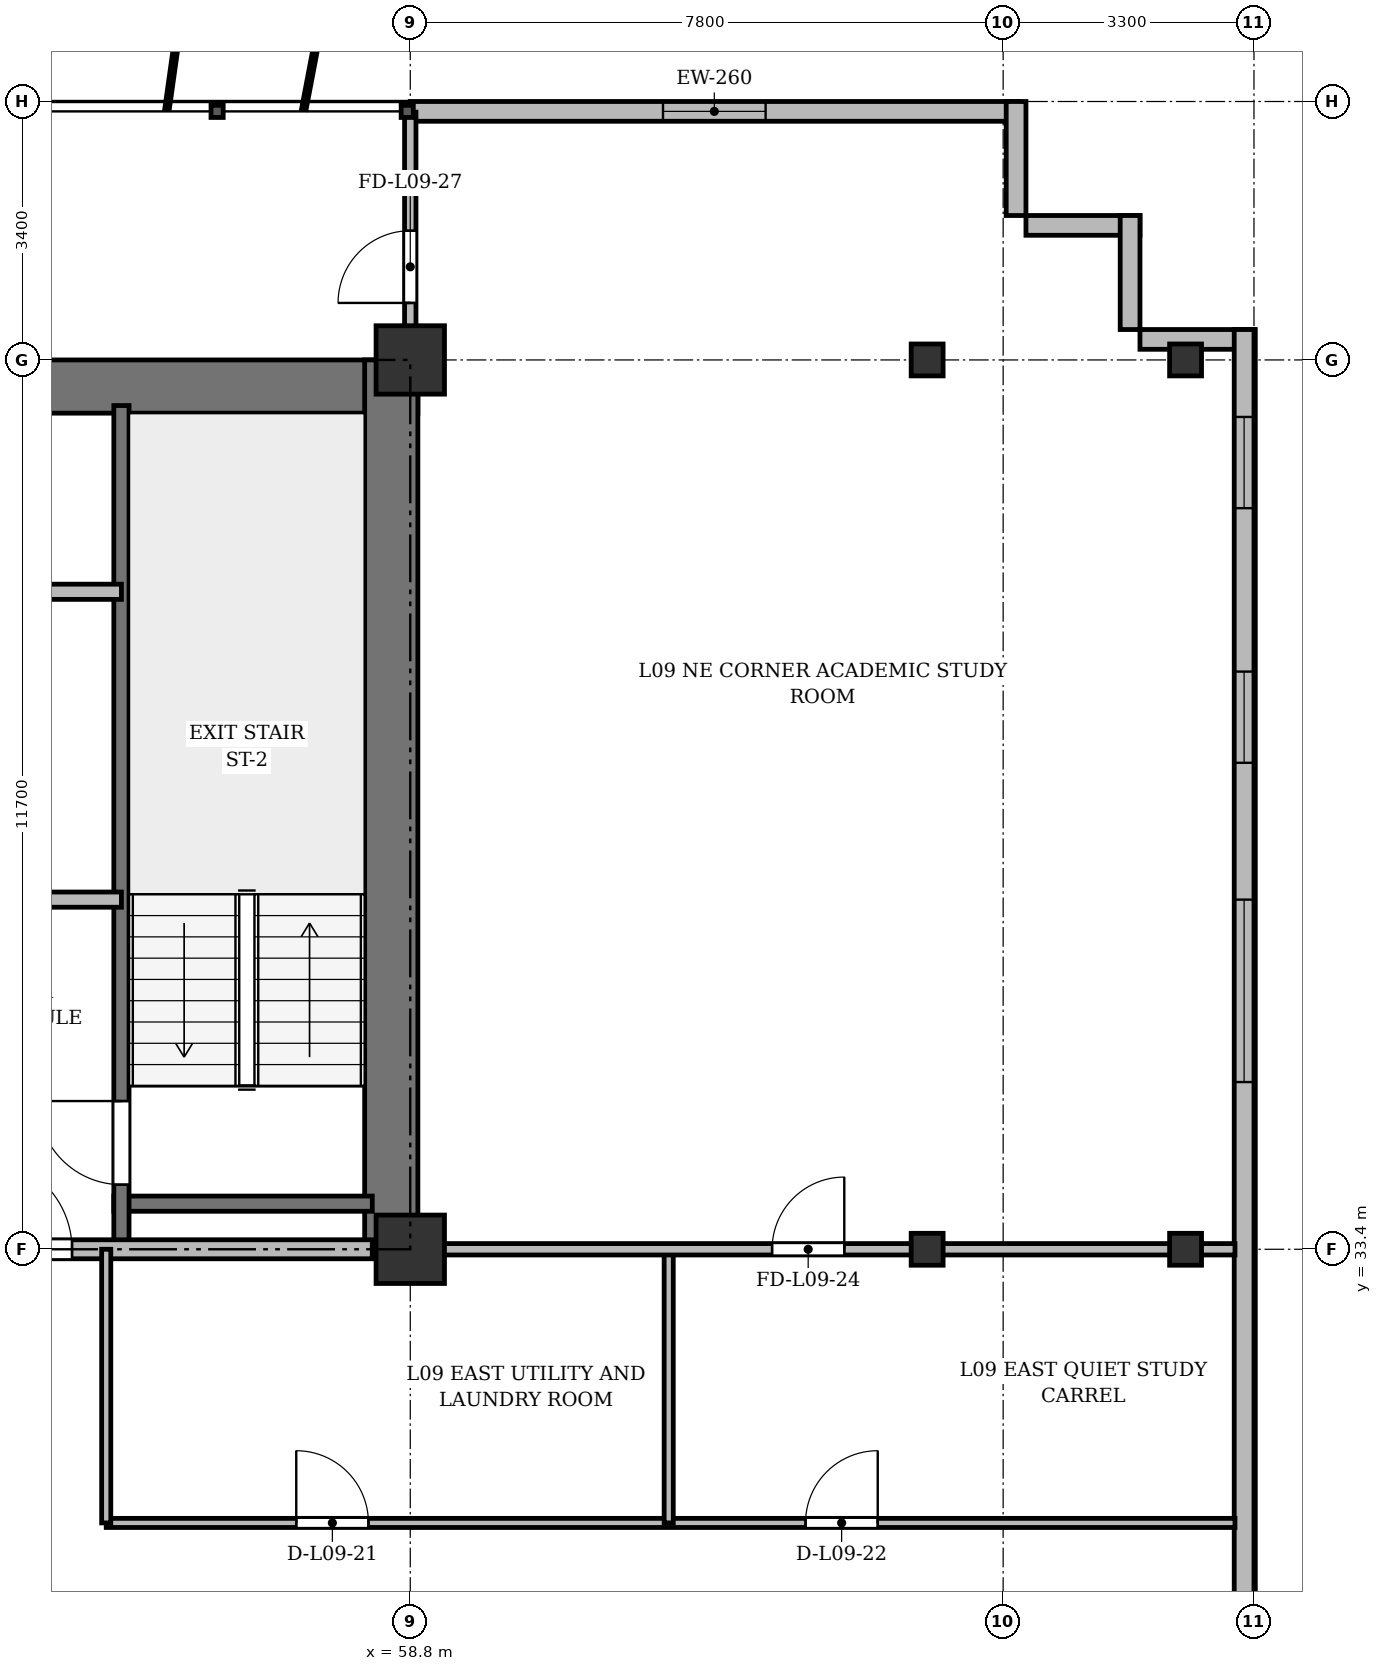
"""IFC4 building model, lengths in metres.
Left out: names, types, materials, properties, quantities, classifications, styles, units other than length and angle.
Written with IfcOpenShell. Run it as: python <this file> out.ifc"""

import sys

from ifc_helpers import new_model, si_unit, direction, frame, frame_2d, origin, origin_2d, place, context, subcontext, project, spatial, rectangle, i_section, extrude, source, transform, mapped, element, fill, save


model = new_model("IFC4")
c1 = context("Model", 3, precision=1e-05, world=origin(), true_north=direction((0.0, 1.0)))
c2 = subcontext(c1, "Body", "Model", "MODEL_VIEW")
j1 = project(units=[si_unit("LENGTHUNIT", "METRE"), si_unit("PLANEANGLEUNIT", "RADIAN")], contexts=[c1])
p1 = place(None, origin())
s1 = spatial("IfcSite", under=j1, at=p1, CompositionType="ELEMENT")
p2 = place(p1, origin())
s2 = spatial("IfcBuilding", under=s1, at=p2, CompositionType="ELEMENT")
p3 = place(p2, frame((0.0, 0.0, 37.9)))
s3 = spatial("IfcBuildingStorey", under=s2, at=p3, CompositionType="ELEMENT", Elevation=37.9)
m1 = source(origin(), c2, "Body", "SweptSolid", [
    extrude(rectangle(XDim=0.9, YDim=0.9, at=origin_2d()), origin(), (0.0, 0.0, 1.0), 3.6),
])
for number, where, z_axis, x_axis in (
    (1, (58.8, 33.4, 0.0), (0.0, 0.0, 1.0), (1.0, 0.0, 0.0)),
    (2, (58.8, 45.1, 0.0), (0.0, 0.0, 1.0), (1.0, 0.0, 0.0)),
):
    element("IfcColumn", number, at=place(p3, frame(where, z_axis=z_axis, x_axis=x_axis)), inside=s3, PredefinedType="COLUMN", context=c2, shape_type="MappedRepresentation", body=[
        mapped(m1, transform((0.0, 0.0, 0.0), x_axis=(1.0, 0.0, 0.0), y_axis=(0.0, 1.0, 0.0), z_axis=(0.0, 0.0, 1.0), scale=1.0)),
    ])
m2 = source(origin(), c2, "Body", "SweptSolid", [
    extrude(i_section(OverallWidth=0.42, OverallDepth=0.42, WebThickness=0.026, FlangeThickness=0.04, at=origin_2d()), origin(), (0.0, 0.0, 1.0), 3.6),
])
for number, where, z_axis, x_axis in (
    (3, (65.6, 33.4, 0.0), (0.0, 0.0, 1.0), (1.0, 0.0, 0.0)),
    (4, (65.6, 45.1, 0.0), (0.0, 0.0, 1.0), (1.0, 0.0, 0.0)),
    (5, (69.0, 33.4, 0.0), (0.0, 0.0, 1.0), (1.0, 0.0, 0.0)),
    (6, (69.0, 45.1, 0.0), (0.0, 0.0, 1.0), (1.0, 0.0, 0.0)),
):
    element("IfcColumn", number, at=place(p3, frame(where, z_axis=z_axis, x_axis=x_axis)), inside=s3, PredefinedType="COLUMN", context=c2, shape_type="MappedRepresentation", body=[
        mapped(m2, transform((0.0, 0.0, 0.0), x_axis=(1.0, 0.0, 0.0), y_axis=(0.0, 1.0, 0.0), z_axis=(0.0, 0.0, 1.0), scale=1.0)),
    ])
p4 = place(p3, frame((58.8, 48.37, 0.0), z_axis=(0.0, 0.0, 1.0), x_axis=(1.0, 0.0, 0.0)))
e7 = element("IfcWall", 7, at=p4, inside=s3, PredefinedType="SOLIDWALL", context=c2, shape_type="SweptSolid", body=[
    extrude(rectangle(XDim=8.0, YDim=0.26, at=frame_2d((4.0, 0.0))), origin(), (0.0, 0.0, 1.0), 3.34),
])
p5 = place(p4, frame((3.325, 0.0, 0.9)))
e8 = element("IfcOpeningElement", 8, at=p5, cuts=e7, PredefinedType="OPENING", context=c2, shape_type="SweptSolid", body=[
    extrude(rectangle(XDim=1.35, YDim=1.5, at=frame_2d((0.675, 0.75))), frame((0.0, 0.14, 0.0), z_axis=(0.0, -1.0, 0.0), x_axis=(1.0, 0.0, 0.0)), (0.0, 0.0, 1.0), 0.28),
])
for number, where, z_axis, x_axis in (
    (9, (66.77, 48.5, 0.0), (0.0, 0.0, 1.0), (0.0, -1.0, 0.0)),
    (10, (66.9, 46.87, 0.0), (0.0, 0.0, 1.0), (1.0, 0.0, 0.0)),
    (11, (68.27, 47.0, 0.0), (0.0, 0.0, 1.0), (0.0, -1.0, 0.0)),
):
    element("IfcWall", number, at=place(p3, frame(where, z_axis=z_axis, x_axis=x_axis)), inside=s3, PredefinedType="SOLIDWALL", context=c2, shape_type="SweptSolid", body=[
        extrude(rectangle(XDim=1.5, YDim=0.26, at=frame_2d((0.75, 0.0))), origin(), (0.0, 0.0, 1.0), 3.34),
    ])
p6 = place(p3, frame((68.4, 45.37, 0.0), z_axis=(0.0, 0.0, 1.0), x_axis=(1.0, 0.0, 0.0)))
e12 = element("IfcWall", 12, at=p6, inside=s3, PredefinedType="SOLIDWALL", context=c2, shape_type="SweptSolid", body=[
    extrude(rectangle(XDim=1.5, YDim=0.26, at=frame_2d((0.75, 0.0))), origin(), (0.0, 0.0, 1.0), 2.69),
])
p7 = place(p3, frame((69.77, 45.5, 0.0), z_axis=(0.0, 0.0, 1.0), x_axis=(0.0, -1.0, 0.0)))
e13 = element("IfcWall", 13, at=p7, inside=s3, PredefinedType="SOLIDWALL", context=c2, shape_type="SweptSolid", body=[
    extrude(rectangle(XDim=39.6, YDim=0.26, at=frame_2d((19.8, 0.0))), origin(), (0.0, 0.0, 1.0), 3.34),
])
p8 = place(p7, frame((36.95, 0.0, 0.92)))
e14 = element("IfcOpeningElement", 14, at=p8, cuts=e13, PredefinedType="OPENING", context=c2, shape_type="SweptSolid", body=[
    extrude(rectangle(XDim=1.2, YDim=1.65, at=frame_2d((0.6, 0.825))), frame((0.0, 0.14, 0.0), z_axis=(0.0, -1.0, 0.0), x_axis=(1.0, 0.0, 0.0)), (0.0, 0.0, 1.0), 0.28),
])
p9 = place(p7, frame((32.9, 0.0, 0.92)))
e15 = element("IfcOpeningElement", 15, at=p9, cuts=e13, PredefinedType="OPENING", context=c2, shape_type="SweptSolid", body=[
    extrude(rectangle(XDim=2.4, YDim=2.1, at=frame_2d((1.2, 1.05))), frame((0.0, 0.14, 0.0), z_axis=(0.0, -1.0, 0.0), x_axis=(1.0, 0.0, 0.0)), (0.0, 0.0, 1.0), 0.28),
])
p10 = place(p7, frame((28.7, 0.0, 0.92)))
e16 = element("IfcOpeningElement", 16, at=p10, cuts=e13, PredefinedType="OPENING", context=c2, shape_type="SweptSolid", body=[
    extrude(rectangle(XDim=2.4, YDim=2.1, at=frame_2d((1.2, 1.05))), frame((0.0, 0.14, 0.0), z_axis=(0.0, -1.0, 0.0), x_axis=(1.0, 0.0, 0.0)), (0.0, 0.0, 1.0), 0.28),
])
p11 = place(p7, frame((7.5, 0.0, 0.92)))
e17 = element("IfcOpeningElement", 17, at=p11, cuts=e13, PredefinedType="OPENING", context=c2, shape_type="SweptSolid", body=[
    extrude(rectangle(XDim=2.4, YDim=2.1, at=frame_2d((1.2, 1.05))), frame((0.0, 0.14, 0.0), z_axis=(0.0, -1.0, 0.0), x_axis=(1.0, 0.0, 0.0)), (0.0, 0.0, 1.0), 0.28),
])
p12 = place(p7, frame((4.5, 0.0, 0.92)))
e18 = element("IfcOpeningElement", 18, at=p12, cuts=e13, PredefinedType="OPENING", context=c2, shape_type="SweptSolid", body=[
    extrude(rectangle(XDim=1.2, YDim=1.65, at=frame_2d((0.6, 0.825))), frame((0.0, 0.14, 0.0), z_axis=(0.0, -1.0, 0.0), x_axis=(1.0, 0.0, 0.0)), (0.0, 0.0, 1.0), 0.28),
])
p13 = place(p7, frame((1.15, 0.0, 0.92)))
e19 = element("IfcOpeningElement", 19, at=p13, cuts=e13, PredefinedType="OPENING", context=c2, shape_type="SweptSolid", body=[
    extrude(rectangle(XDim=1.2, YDim=1.65, at=frame_2d((0.6, 0.825))), frame((0.0, 0.14, 0.0), z_axis=(0.0, -1.0, 0.0), x_axis=(1.0, 0.0, 0.0)), (0.0, 0.0, 1.0), 0.28),
])
p14 = place(p3, frame((15.5, 44.75, 0.0), z_axis=(0.0, 0.0, 1.0), x_axis=(1.0, 0.0, 0.0)))
e20 = element("IfcWall", 20, at=p14, inside=s3, PredefinedType="SHEAR", context=c2, shape_type="SweptSolid", body=[
    extrude(rectangle(XDim=43.4, YDim=0.7, at=frame_2d((21.7, 0.0))), origin(), (0.0, 0.0, 1.0), 3.34),
])
p15 = place(p3, frame((58.55, 33.4, 0.0), z_axis=(0.0, 0.0, 1.0), x_axis=(0.0, 1.0, 0.0)))
e21 = element("IfcWall", 21, at=p15, inside=s3, PredefinedType="SHEAR", context=c2, shape_type="SweptSolid", body=[
    extrude(rectangle(XDim=11.7, YDim=0.7, at=frame_2d((5.85, 0.0))), origin(), (0.0, 0.0, 1.0), 3.34),
])
p16 = place(p3, frame((54.9, 34.0, 0.0), z_axis=(0.0, 0.0, 1.0), x_axis=(1.0, 0.0, 0.0)))
e22 = element("IfcWall", 22, at=p16, inside=s3, PredefinedType="SHEAR", context=c2, shape_type="SweptSolid", body=[
    extrude(rectangle(XDim=3.4, YDim=0.2, at=frame_2d((1.7, 0.0))), origin(), (0.0, 0.0, 1.0), 3.34),
])
p17 = place(p3, frame((55.0, 33.4, 0.0), z_axis=(0.0, 0.0, 1.0), x_axis=(0.0, 1.0, 0.0)))
e23 = element("IfcWall", 23, at=p17, inside=s3, PredefinedType="SHEAR", context=c2, shape_type="SweptSolid", body=[
    extrude(rectangle(XDim=11.1, YDim=0.2, at=frame_2d((5.55, 0.0))), origin(), (0.0, 0.0, 1.0), 3.34),
])
p18 = place(p17, frame((0.85, 0.0, 0.0)))
e24 = element("IfcOpeningElement", 24, at=p18, cuts=e23, PredefinedType="OPENING", context=c2, shape_type="SweptSolid", body=[
    extrude(rectangle(XDim=1.1, YDim=2.15, at=frame_2d((0.55, 1.075))), frame((0.0, 0.11, 0.0), z_axis=(0.0, -1.0, 0.0), x_axis=(1.0, 0.0, 0.0)), (0.0, 0.0, 1.0), 0.22),
])
p19 = place(p3, frame((47.15, 42.05, 0.0), z_axis=(0.0, 0.0, 1.0), x_axis=(1.0, 0.0, 0.0)))
e25 = element("IfcWall", 25, at=p19, inside=s3, PredefinedType="SOLIDWALL", context=c2, shape_type="SweptSolid", body=[
    extrude(rectangle(XDim=7.85, YDim=0.2, at=frame_2d((3.925, 0.0))), origin(), (0.0, 0.0, 1.0), 2.752),
])
p20 = place(p19, frame((0.75, 0.0, 0.0)))
e26 = element("IfcOpeningElement", 26, at=p20, cuts=e25, PredefinedType="OPENING", context=c2, shape_type="SweptSolid", body=[
    extrude(rectangle(XDim=0.9, YDim=2.1, at=frame_2d((0.45, 1.05))), frame((0.0, 0.11, 0.0), z_axis=(0.0, -1.0, 0.0), x_axis=(1.0, 0.0, 0.0)), (0.0, 0.0, 1.0), 0.22),
])
p21 = place(p19, frame((3.85, 0.0, 0.0)))
e27 = element("IfcOpeningElement", 27, at=p21, cuts=e25, PredefinedType="OPENING", context=c2, shape_type="SweptSolid", body=[
    extrude(rectangle(XDim=0.9, YDim=2.1, at=frame_2d((0.45, 1.05))), frame((0.0, 0.11, 0.0), z_axis=(0.0, -1.0, 0.0), x_axis=(1.0, 0.0, 0.0)), (0.0, 0.0, 1.0), 0.22),
])
p22 = place(p3, frame((52.45, 38.0, 0.0), z_axis=(0.0, 0.0, 1.0), x_axis=(1.0, 0.0, 0.0)))
e28 = element("IfcWall", 28, at=p22, inside=s3, PredefinedType="PARTITIONING", context=c2, shape_type="SweptSolid", body=[
    extrude(rectangle(XDim=2.55, YDim=0.2, at=frame_2d((1.275, 0.0))), origin(), (0.0, 0.0, 1.0), 3.34),
])
p23 = place(p3, frame((47.15, 33.4, 0.0), z_axis=(0.0, 0.0, 1.0), x_axis=(1.0, 0.0, 0.0)))
e29 = element("IfcWall", 29, at=p23, inside=s3, PredefinedType="PARTITIONING", context=c2, shape_type="SweptSolid", body=[
    extrude(rectangle(XDim=11.15, YDim=0.25, at=frame_2d((5.575, 0.0))), origin(), (0.0, 0.0, 1.0), 2.69),
])
p24 = place(p23, frame((0.7, 0.0, 0.0)))
e30 = element("IfcOpeningElement", 30, at=p24, cuts=e29, PredefinedType="OPENING", context=c2, shape_type="SweptSolid", body=[
    extrude(rectangle(XDim=0.95, YDim=2.15, at=frame_2d((0.475, 1.075))), frame((0.0, 0.135, 0.0), z_axis=(0.0, -1.0, 0.0), x_axis=(1.0, 0.0, 0.0)), (0.0, 0.0, 1.0), 0.27),
])
p25 = place(p23, frame((6.0, 0.0, 0.0)))
e31 = element("IfcOpeningElement", 31, at=p25, cuts=e29, PredefinedType="OPENING", context=c2, shape_type="SweptSolid", body=[
    extrude(rectangle(XDim=1.2, YDim=2.15, at=frame_2d((0.6, 1.075))), frame((0.0, 0.135, 0.0), z_axis=(0.0, -1.0, 0.0), x_axis=(1.0, 0.0, 0.0)), (0.0, 0.0, 1.0), 0.27),
])
p26 = place(p3, frame((54.8, 29.8, 0.0), z_axis=(0.0, 0.0, 1.0), x_axis=(1.0, 0.0, 0.0)))
e32 = element("IfcWall", 32, at=p26, inside=s3, PredefinedType="PARTITIONING", context=c2, shape_type="SweptSolid", body=[
    extrude(rectangle(XDim=14.85, YDim=0.12, at=frame_2d((7.425, 0.0))), origin(), (0.0, 0.0, 1.0), 2.752),
])
p27 = place(p26, frame((2.5, 0.0, 0.0)))
e33 = element("IfcOpeningElement", 33, at=p27, cuts=e32, PredefinedType="OPENING", context=c2, shape_type="SweptSolid", body=[
    extrude(rectangle(XDim=0.95, YDim=2.15, at=frame_2d((0.475, 1.075))), frame((0.0, 0.07, 0.0), z_axis=(0.0, -1.0, 0.0), x_axis=(1.0, 0.0, 0.0)), (0.0, 0.0, 1.0), 0.14),
])
p28 = place(p26, frame((9.2, 0.0, 0.0)))
e34 = element("IfcOpeningElement", 34, at=p28, cuts=e32, PredefinedType="OPENING", context=c2, shape_type="SweptSolid", body=[
    extrude(rectangle(XDim=0.95, YDim=2.15, at=frame_2d((0.475, 1.075))), frame((0.0, 0.07, 0.0), z_axis=(0.0, -1.0, 0.0), x_axis=(1.0, 0.0, 0.0)), (0.0, 0.0, 1.0), 0.14),
])
for number, where, z_axis, x_axis in (
    (35, (62.2, 29.8, 0.0), (0.0, 0.0, 1.0), (0.0, 1.0, 0.0)),
    (36, (54.8, 29.8, 0.0), (0.0, 0.0, 1.0), (0.0, 1.0, 0.0)),
):
    element("IfcWall", number, at=place(p3, frame(where, z_axis=z_axis, x_axis=x_axis)), inside=s3, PredefinedType="PARTITIONING", context=c2, shape_type="SweptSolid", body=[
        extrude(rectangle(XDim=3.6, YDim=0.12, at=frame_2d((1.8, 0.0))), origin(), (0.0, 0.0, 1.0), 2.69),
    ])
p29 = place(p3, frame((58.8, 33.4, 0.0), z_axis=(0.0, 0.0, 1.0), x_axis=(1.0, 0.0, 0.0)))
e37 = element("IfcWall", 37, at=p29, inside=s3, PredefinedType="PARTITIONING", context=c2, shape_type="SweptSolid", body=[
    extrude(rectangle(XDim=10.85, YDim=0.15, at=frame_2d((5.425, 0.0))), origin(), (0.0, 0.0, 1.0), 2.69),
])
p30 = place(p29, frame((4.76, 0.0, 0.0)))
e38 = element("IfcOpeningElement", 38, at=p30, cuts=e37, PredefinedType="OPENING", context=c2, shape_type="SweptSolid", body=[
    extrude(rectangle(XDim=0.95, YDim=2.15, at=frame_2d((0.475, 1.075))), frame((0.0, 0.085, 0.0), z_axis=(0.0, -1.0, 0.0), x_axis=(1.0, 0.0, 0.0)), (0.0, 0.0, 1.0), 0.17),
])
p31 = place(p3, frame((58.8, 44.75, 0.0), z_axis=(0.0, 0.0, 1.0), x_axis=(0.0, 1.0, 0.0)))
e39 = element("IfcWall", 39, at=p31, inside=s3, PredefinedType="PARTITIONING", context=c2, shape_type="SweptSolid", body=[
    extrude(rectangle(XDim=3.61, YDim=0.15, at=frame_2d((1.805, 0.0))), origin(), (0.0, 0.0, 1.0), 2.752),
])
p32 = place(p31, frame((1.1, 0.0, 0.0)))
e40 = element("IfcOpeningElement", 40, at=p32, cuts=e39, PredefinedType="OPENING", context=c2, shape_type="SweptSolid", body=[
    extrude(rectangle(XDim=0.95, YDim=2.15, at=frame_2d((0.475, 1.075))), frame((0.0, 0.085, 0.0), z_axis=(0.0, -1.0, 0.0), x_axis=(1.0, 0.0, 0.0)), (0.0, 0.0, 1.0), 0.17),
])
m3 = source(origin(), c2, "Body", "SweptSolid", [
    extrude(rectangle(XDim=1.35, YDim=1.5, at=frame_2d((0.675, 0.75))), frame((0.0, 0.03, 0.0), z_axis=(0.0, -1.0, 0.0), x_axis=(1.0, 0.0, 0.0)), (0.0, 0.0, 1.0), 0.06),
])
p33 = place(p5, origin())
e41 = element("IfcWindow", 41, at=p33, inside=s3, PartitioningType="SINGLE_PANEL", PredefinedType="WINDOW", context=c2, shape_type="MappedRepresentation", body=[
    mapped(m3, transform((0.0, 0.0, 0.0), x_axis=(1.0, 0.0, 0.0), y_axis=(0.0, 1.0, 0.0), z_axis=(0.0, 0.0, 1.0), scale=1.0)),
])
fill(e8, e41)
m4 = source(origin(), c2, "Body", "SweptSolid", [
    extrude(rectangle(XDim=2.4, YDim=2.1, at=frame_2d((1.2, 1.05))), frame((0.0, 0.03, 0.0), z_axis=(0.0, -1.0, 0.0), x_axis=(1.0, 0.0, 0.0)), (0.0, 0.0, 1.0), 0.06),
])
p34 = place(p11, origin())
e42 = element("IfcWindow", 42, at=p34, inside=s3, PartitioningType="SINGLE_PANEL", PredefinedType="WINDOW", context=c2, shape_type="MappedRepresentation", body=[
    mapped(m4, transform((0.0, 0.0, 0.0), x_axis=(1.0, 0.0, 0.0), y_axis=(0.0, 1.0, 0.0), z_axis=(0.0, 0.0, 1.0), scale=1.0)),
])
fill(e17, e42)
m5 = source(origin(), c2, "Body", "SweptSolid", [
    extrude(rectangle(XDim=1.2, YDim=1.65, at=frame_2d((0.6, 0.825))), frame((0.0, 0.03, 0.0), z_axis=(0.0, -1.0, 0.0), x_axis=(1.0, 0.0, 0.0)), (0.0, 0.0, 1.0), 0.06),
])
p35 = place(p12, origin())
e43 = element("IfcWindow", 43, at=p35, inside=s3, PartitioningType="SINGLE_PANEL", PredefinedType="WINDOW", context=c2, shape_type="MappedRepresentation", body=[
    mapped(m5, transform((0.0, 0.0, 0.0), x_axis=(1.0, 0.0, 0.0), y_axis=(0.0, 1.0, 0.0), z_axis=(0.0, 0.0, 1.0), scale=1.0)),
])
fill(e18, e43)
p36 = place(p13, origin())
e44 = element("IfcWindow", 44, at=p36, inside=s3, PartitioningType="SINGLE_PANEL", PredefinedType="WINDOW", context=c2, shape_type="MappedRepresentation", body=[
    mapped(m5, transform((0.0, 0.0, 0.0), x_axis=(1.0, 0.0, 0.0), y_axis=(0.0, 1.0, 0.0), z_axis=(0.0, 0.0, 1.0), scale=1.0)),
])
fill(e19, e44)
m6 = source(origin(), c2, "Body", "SweptSolid", [
    extrude(rectangle(XDim=1.1, YDim=2.15, at=frame_2d((0.55, 1.075))), frame((0.0, 0.025, 0.0), z_axis=(0.0, -1.0, 0.0), x_axis=(1.0, 0.0, 0.0)), (0.0, 0.0, 1.0), 0.05),
])
p37 = place(p18, origin())
e45 = element("IfcDoor", 45, at=p37, inside=s3, OperationType="SINGLE_SWING_RIGHT", PredefinedType="DOOR", context=c2, shape_type="MappedRepresentation", body=[
    mapped(m6, transform((0.0, 0.0, 0.0), x_axis=(1.0, 0.0, 0.0), y_axis=(0.0, 1.0, 0.0), z_axis=(0.0, 0.0, 1.0), scale=1.0)),
])
fill(e24, e45)
m7 = source(origin(), c2, "Body", "SweptSolid", [
    extrude(rectangle(XDim=1.2, YDim=2.15, at=frame_2d((0.6, 1.075))), frame((0.0, 0.025, 0.0), z_axis=(0.0, -1.0, 0.0), x_axis=(1.0, 0.0, 0.0)), (0.0, 0.0, 1.0), 0.05),
])
p38 = place(p25, origin())
e46 = element("IfcDoor", 46, at=p38, inside=s3, OperationType="SINGLE_SWING_LEFT", PredefinedType="DOOR", context=c2, shape_type="MappedRepresentation", body=[
    mapped(m7, transform((0.0, 0.0, 0.0), x_axis=(1.0, 0.0, 0.0), y_axis=(0.0, 1.0, 0.0), z_axis=(0.0, 0.0, 1.0), scale=1.0)),
])
fill(e31, e46)
m8 = source(origin(), c2, "Body", "SweptSolid", [
    extrude(rectangle(XDim=0.95, YDim=2.15, at=frame_2d((0.475, 1.075))), frame((0.0, 0.025, 0.0), z_axis=(0.0, -1.0, 0.0), x_axis=(1.0, 0.0, 0.0)), (0.0, 0.0, 1.0), 0.05),
])
p39 = place(p27, origin())
e47 = element("IfcDoor", 47, at=p39, inside=s3, OperationType="SINGLE_SWING_LEFT", PredefinedType="DOOR", context=c2, shape_type="MappedRepresentation", body=[
    mapped(m8, transform((0.0, 0.0, 0.0), x_axis=(1.0, 0.0, 0.0), y_axis=(0.0, 1.0, 0.0), z_axis=(0.0, 0.0, 1.0), scale=1.0)),
])
fill(e33, e47)
p40 = place(p28, origin())
e48 = element("IfcDoor", 48, at=p40, inside=s3, OperationType="SINGLE_SWING_RIGHT", PredefinedType="DOOR", context=c2, shape_type="MappedRepresentation", body=[
    mapped(m8, transform((0.0, 0.0, 0.0), x_axis=(1.0, 0.0, 0.0), y_axis=(0.0, 1.0, 0.0), z_axis=(0.0, 0.0, 1.0), scale=1.0)),
])
fill(e34, e48)
p41 = place(p30, origin())
e49 = element("IfcDoor", 49, at=p41, inside=s3, OperationType="SINGLE_SWING_RIGHT", PredefinedType="DOOR", context=c2, shape_type="MappedRepresentation", body=[
    mapped(m8, transform((0.0, 0.0, 0.0), x_axis=(1.0, 0.0, 0.0), y_axis=(0.0, 1.0, 0.0), z_axis=(0.0, 0.0, 1.0), scale=1.0)),
])
fill(e38, e49)
p42 = place(p32, origin())
e50 = element("IfcDoor", 50, at=p42, inside=s3, OperationType="SINGLE_SWING_LEFT", PredefinedType="DOOR", context=c2, shape_type="MappedRepresentation", body=[
    mapped(m8, transform((0.0, 0.0, 0.0), x_axis=(1.0, 0.0, 0.0), y_axis=(0.0, 1.0, 0.0), z_axis=(0.0, 0.0, 1.0), scale=1.0)),
])
fill(e40, e50)
save(model, sys.argv[1])
